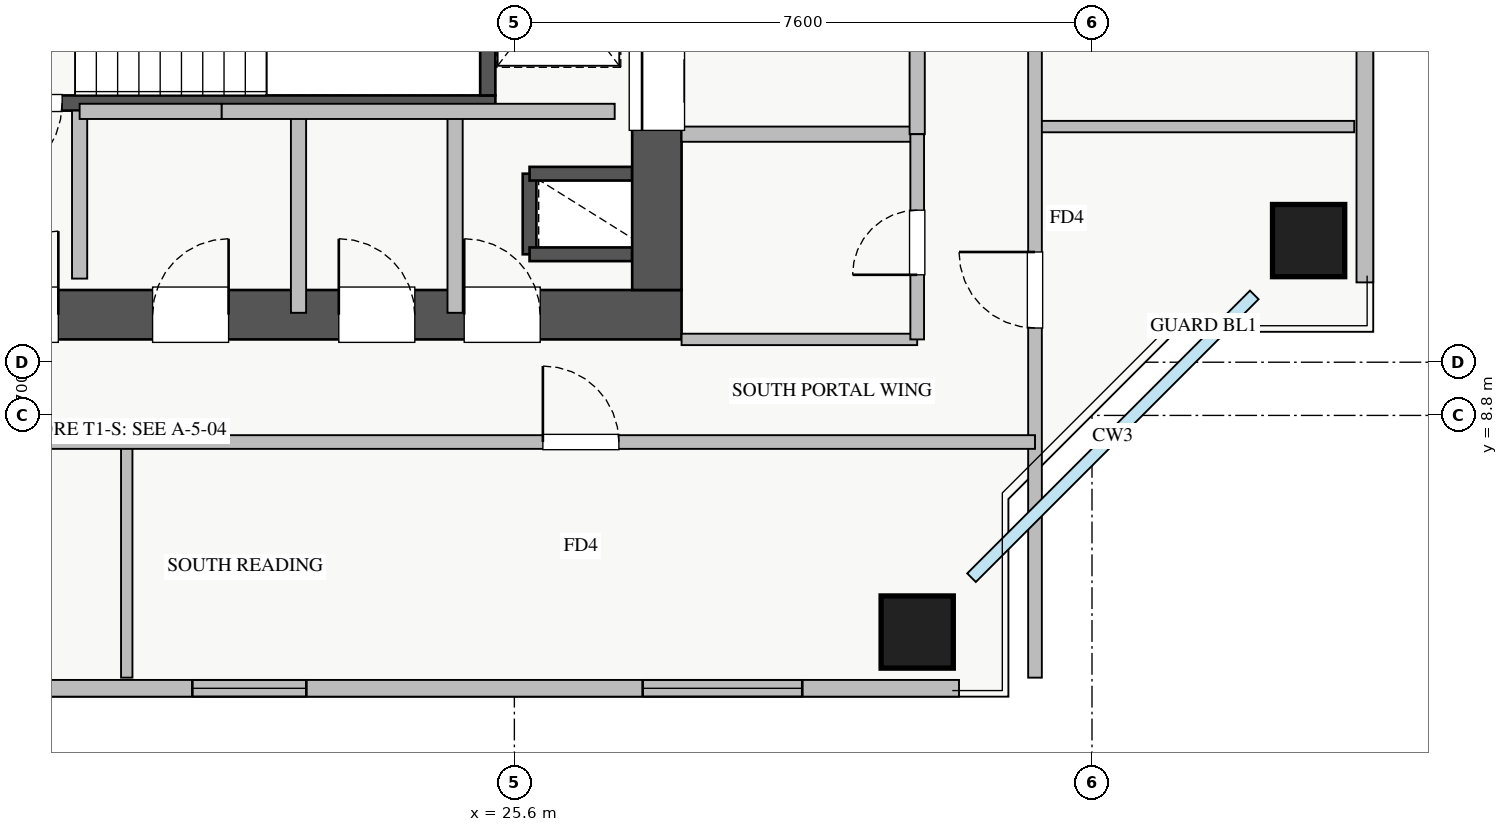
"""IFC4 building model, lengths in metres.
Left out: names, types, materials, properties, quantities, classifications, styles, units other than length and angle.
Written with IfcOpenShell. Run it as: python <this file> out.ifc"""

import sys

from ifc_helpers import new_model, si_unit, direction, frame, frame_2d, origin, origin_2d, place, context, subcontext, project, spatial, rectangle, extrude, source, transform, mapped, element, fill, save


model = new_model("IFC4")
c1 = context("Model", 3, precision=1e-05, world=origin(), true_north=direction((0.0, 1.0)))
c2 = subcontext(c1, "Body", "Model", "MODEL_VIEW")
j1 = project(units=[si_unit("LENGTHUNIT", "METRE"), si_unit("PLANEANGLEUNIT", "RADIAN")], contexts=[c1])
p1 = place(None, origin())
s1 = spatial("IfcSite", under=j1, at=p1, CompositionType="ELEMENT")
p2 = place(p1, origin())
s2 = spatial("IfcBuilding", under=s1, at=p2, CompositionType="ELEMENT")
p3 = place(p2, frame((0.0, 0.0, 169.75)))
s3 = spatial("IfcBuildingStorey", under=s2, at=p3, CompositionType="ELEMENT", Elevation=169.75)
p4 = place(p3, frame((25.8, 10.92, 0.0), z_axis=(0.0, 0.0, 1.0), x_axis=(0.0, 1.0, 0.0)))
e1 = element("IfcWall", 1, at=p4, inside=s3, PredefinedType="SHEAR", context=c2, shape_type="SweptSolid", body=[
    extrude(rectangle(XDim=1.06, YDim=0.18, at=frame_2d((0.53, 0.0))), origin(), (0.0, 0.0, 1.0), 3.0),
])
for number, where, z_axis, x_axis in (
    (2, (25.8, 11.98, 0.0), (0.0, 0.0, 1.0), (1.0, 0.0, 0.0)),
    (3, (25.8, 10.92, 0.0), (0.0, 0.0, 1.0), (1.0, 0.0, 0.0)),
):
    element("IfcWall", number, at=place(p3, frame(where, z_axis=z_axis, x_axis=x_axis)), inside=s3, PredefinedType="SHEAR", context=c2, shape_type="SweptSolid", body=[
        extrude(rectangle(XDim=1.35, YDim=0.18, at=frame_2d((0.675, 0.0))), origin(), (0.0, 0.0, 1.0), 3.0),
    ])
p5 = place(p3, frame((18.2, 12.91, 0.0), z_axis=(0.0, 0.0, 1.0), x_axis=(1.0, 0.0, 0.0)))
e4 = element("IfcWall", 4, at=p5, inside=s3, PredefinedType="SHEAR", context=c2, shape_type="SweptSolid", body=[
    extrude(rectangle(XDim=7.15, YDim=0.2, at=frame_2d((3.575, 0.0))), origin(), (0.0, 0.0, 1.0), 3.25),
])
p6 = place(p5, frame((0.35, 0.0, 0.0)))
e5 = element("IfcOpeningElement", 5, at=p6, cuts=e4, PredefinedType="OPENING", context=c2, shape_type="SweptSolid", body=[
    extrude(rectangle(XDim=1.1, YDim=2.05, at=frame_2d((0.55, 1.025))), frame((0.0, 0.11, 0.0), z_axis=(0.0, -1.0, 0.0), x_axis=(1.0, 0.0, 0.0)), (0.0, 0.0, 1.0), 0.22),
])
p7 = place(p3, frame((25.25, 13.01, 0.0), z_axis=(0.0, 0.0, 1.0), x_axis=(0.0, 1.0, 0.0)))
e6 = element("IfcWall", 6, at=p7, inside=s3, PredefinedType="SHEAR", context=c2, shape_type="SweptSolid", body=[
    extrude(rectangle(XDim=2.94, YDim=0.2, at=frame_2d((1.47, 0.0))), origin(), (0.0, 0.0, 1.0), 3.25),
])
p8 = place(p3, frame((10.2, 10.125, 0.0), z_axis=(0.0, 0.0, 1.0), x_axis=(1.0, 0.0, 0.0)))
e7 = element("IfcWall", 7, at=p8, inside=s3, PredefinedType="SHEAR", context=c2, shape_type="SweptSolid", body=[
    extrude(rectangle(XDim=17.6, YDim=0.65, at=frame_2d((8.8, 0.0))), origin(), (0.0, 0.0, 1.0), 3.25),
])
p9 = place(p8, frame((1.15, 0.0, 0.0)))
e8 = element("IfcOpeningElement", 8, at=p9, cuts=e7, PredefinedType="OPENING", context=c2, shape_type="SweptSolid", body=[
    extrude(rectangle(XDim=1.1, YDim=2.05, at=frame_2d((0.55, 1.025))), frame((0.0, 0.335, 0.0), z_axis=(0.0, -1.0, 0.0), x_axis=(1.0, 0.0, 0.0)), (0.0, 0.0, 1.0), 0.67),
])
p10 = place(p8, frame((8.3, 0.0, 0.0)))
e9 = element("IfcOpeningElement", 9, at=p10, cuts=e7, PredefinedType="OPENING", context=c2, shape_type="SweptSolid", body=[
    extrude(rectangle(XDim=1.1, YDim=2.05, at=frame_2d((0.55, 1.025))), frame((0.0, 0.335, 0.0), z_axis=(0.0, -1.0, 0.0), x_axis=(1.0, 0.0, 0.0)), (0.0, 0.0, 1.0), 0.67),
])
p11 = place(p8, frame((4.9, 0.0, 0.0)))
e10 = element("IfcOpeningElement", 10, at=p11, cuts=e7, PredefinedType="OPENING", context=c2, shape_type="SweptSolid", body=[
    extrude(rectangle(XDim=1.1, YDim=2.05, at=frame_2d((0.55, 1.025))), frame((0.0, 0.335, 0.0), z_axis=(0.0, -1.0, 0.0), x_axis=(1.0, 0.0, 0.0)), (0.0, 0.0, 1.0), 0.67),
])
p12 = place(p8, frame((14.74, 0.0, 0.0)))
e11 = element("IfcOpeningElement", 11, at=p12, cuts=e7, PredefinedType="OPENING", context=c2, shape_type="SweptSolid", body=[
    extrude(rectangle(XDim=1.0, YDim=2.05, at=frame_2d((0.5, 1.025))), frame((0.0, 0.335, 0.0), z_axis=(0.0, -1.0, 0.0), x_axis=(1.0, 0.0, 0.0)), (0.0, 0.0, 1.0), 0.67),
])
p13 = place(p8, frame((10.64, 0.0, 0.0)))
e12 = element("IfcOpeningElement", 12, at=p13, cuts=e7, PredefinedType="OPENING", context=c2, shape_type="SweptSolid", body=[
    extrude(rectangle(XDim=1.0, YDim=2.05, at=frame_2d((0.5, 1.025))), frame((0.0, 0.335, 0.0), z_axis=(0.0, -1.0, 0.0), x_axis=(1.0, 0.0, 0.0)), (0.0, 0.0, 1.0), 0.67),
])
p14 = place(p8, frame((13.09, 0.0, 0.0)))
e13 = element("IfcOpeningElement", 13, at=p14, cuts=e7, PredefinedType="OPENING", context=c2, shape_type="SweptSolid", body=[
    extrude(rectangle(XDim=1.0, YDim=2.05, at=frame_2d((0.5, 1.025))), frame((0.0, 0.335, 0.0), z_axis=(0.0, -1.0, 0.0), x_axis=(1.0, 0.0, 0.0)), (0.0, 0.0, 1.0), 0.67),
])
p15 = place(p3, frame((27.475, 10.45, 0.0), z_axis=(0.0, 0.0, 1.0), x_axis=(0.0, 1.0, 0.0)))
e14 = element("IfcWall", 14, at=p15, inside=s3, PredefinedType="SHEAR", context=c2, shape_type="SweptSolid", body=[
    extrude(rectangle(XDim=5.9, YDim=0.65, at=frame_2d((2.95, 0.0))), origin(), (0.0, 0.0, 1.0), 3.25),
])
p16 = place(p15, frame((2.1, 0.0, 0.0)))
e15 = element("IfcOpeningElement", 15, at=p16, cuts=e14, PredefinedType="OPENING", context=c2, shape_type="SweptSolid", body=[
    extrude(rectangle(XDim=1.3, YDim=2.05, at=frame_2d((0.65, 1.025))), frame((0.0, 0.335, 0.0), z_axis=(0.0, -1.0, 0.0), x_axis=(1.0, 0.0, 0.0)), (0.0, 0.0, 1.0), 0.67),
])
m1 = source(origin(), c2, "Body", "SweptSolid", [
    extrude(rectangle(XDim=0.95, YDim=0.95, at=origin_2d()), origin(), (0.0, 0.0, 1.0), 3.25),
])
for number, where, z_axis, x_axis in (
    (16, (30.9, 5.95, 0.0), (0.0, 0.0, 1.0), (1.0, 0.0, 0.0)),
    (17, (36.05, 11.1, 0.0), (0.0, 0.0, 1.0), (1.0, 0.0, 0.0)),
):
    element("IfcColumn", number, at=place(p3, frame(where, z_axis=z_axis, x_axis=x_axis)), inside=s3, PredefinedType="COLUMN", context=c2, shape_type="MappedRepresentation", body=[
        mapped(m1, transform((0.0, 0.0, 0.0), x_axis=(1.0, 0.0, 0.0), y_axis=(0.0, 1.0, 0.0), z_axis=(0.0, 0.0, 1.0), scale=1.0)),
    ])
p17 = place(p3, frame((36.79, 10.55, 0.0), z_axis=(0.0, 0.0, 1.0), x_axis=(0.0, 1.0, 0.0)))
e18 = element("IfcWall", 18, at=p17, inside=s3, PredefinedType="STANDARD", context=c2, shape_type="SweptSolid", body=[
    extrude(rectangle(XDim=6.3, YDim=0.22, at=frame_2d((3.15, 0.0))), origin(), (0.0, 0.0, 1.0), 2.54),
])
p18 = place(p3, frame((6.55, 5.21, 0.0), z_axis=(0.0, 0.0, 1.0), x_axis=(1.0, 0.0, 0.0)))
e19 = element("IfcWall", 19, at=p18, inside=s3, PredefinedType="STANDARD", context=c2, shape_type="SweptSolid", body=[
    extrude(rectangle(XDim=24.9, YDim=0.22, at=frame_2d((12.45, 0.0))), origin(), (0.0, 0.0, 1.0), 2.54),
])
p19 = place(p18, frame((0.3, 0.0, 0.9)))
e20 = element("IfcOpeningElement", 20, at=p19, cuts=e19, PredefinedType="OPENING", context=c2, shape_type="SweptSolid", body=[
    extrude(rectangle(XDim=1.5, YDim=1.5, at=frame_2d((0.75, 0.75))), frame((0.0, 0.12, 0.0), z_axis=(0.0, -1.0, 0.0), x_axis=(1.0, 0.0, 0.0)), (0.0, 0.0, 1.0), 0.24),
])
p20 = place(p18, frame((8.438, 0.0, 0.9)))
e21 = element("IfcOpeningElement", 21, at=p20, cuts=e19, PredefinedType="OPENING", context=c2, shape_type="SweptSolid", body=[
    extrude(rectangle(XDim=1.8, YDim=1.45, at=frame_2d((0.9, 0.725))), frame((0.0, 0.12, 0.0), z_axis=(0.0, -1.0, 0.0), x_axis=(1.0, 0.0, 0.0)), (0.0, 0.0, 1.0), 0.24),
])
p21 = place(p18, frame((14.813, 0.0, 0.9)))
e22 = element("IfcOpeningElement", 22, at=p21, cuts=e19, PredefinedType="OPENING", context=c2, shape_type="SweptSolid", body=[
    extrude(rectangle(XDim=1.5, YDim=1.45, at=frame_2d((0.75, 0.725))), frame((0.0, 0.12, 0.0), z_axis=(0.0, -1.0, 0.0), x_axis=(1.0, 0.0, 0.0)), (0.0, 0.0, 1.0), 0.24),
])
p22 = place(p18, frame((20.738, 0.0, 0.9)))
e23 = element("IfcOpeningElement", 23, at=p22, cuts=e19, PredefinedType="OPENING", context=c2, shape_type="SweptSolid", body=[
    extrude(rectangle(XDim=2.1, YDim=1.46, at=frame_2d((1.05, 0.73))), frame((0.0, 0.12, 0.0), z_axis=(0.0, -1.0, 0.0), x_axis=(1.0, 0.0, 0.0)), (0.0, 0.0, 1.0), 0.24),
])
p23 = place(p18, frame((4.094, 0.0, 0.9)))
e24 = element("IfcOpeningElement", 24, at=p23, cuts=e19, PredefinedType="OPENING", context=c2, shape_type="SweptSolid", body=[
    extrude(rectangle(XDim=2.4, YDim=1.5, at=frame_2d((1.2, 0.75))), frame((0.0, 0.12, 0.0), z_axis=(0.0, -1.0, 0.0), x_axis=(1.0, 0.0, 0.0)), (0.0, 0.0, 1.0), 0.24),
])
p24 = place(p3, frame((27.8, 12.5, 0.0), z_axis=(0.0, 0.0, 1.0), x_axis=(1.0, 0.0, 0.0)))
e25 = element("IfcWall", 25, at=p24, inside=s3, PredefinedType="PARTITIONING", context=c2, shape_type="SweptSolid", body=[
    extrude(rectangle(XDim=3.1, YDim=0.2, at=frame_2d((1.55, 0.0))), origin(), (0.0, 0.0, 1.0), 3.0),
])
p25 = place(p3, frame((30.9, 12.5, 0.0), z_axis=(0.0, 0.0, 1.0), x_axis=(0.0, 1.0, 0.0)))
e26 = element("IfcWall", 26, at=p25, inside=s3, PredefinedType="PARTITIONING", context=c2, shape_type="SweptSolid", body=[
    extrude(rectangle(XDim=3.9, YDim=0.2, at=frame_2d((1.95, 0.0))), origin(), (0.0, 0.0, 1.0), 3.0),
])
p26 = place(p25, frame((1.4, 0.0, 0.0)))
e27 = element("IfcOpeningElement", 27, at=p26, cuts=e26, PredefinedType="OPENING", context=c2, shape_type="SweptSolid", body=[
    extrude(rectangle(XDim=1.1, YDim=2.05, at=frame_2d((0.55, 1.025))), frame((0.0, 0.11, 0.0), z_axis=(0.0, -1.0, 0.0), x_axis=(1.0, 0.0, 0.0)), (0.0, 0.0, 1.0), 0.22),
])
p27 = place(p3, frame((19.88, 10.6, 0.0), z_axis=(0.0, 0.0, 1.0), x_axis=(0.0, 1.0, 0.0)))
e28 = element("IfcWall", 28, at=p27, inside=s3, PredefinedType="PARTITIONING", context=c2, shape_type="SweptSolid", body=[
    extrude(rectangle(XDim=2.21, YDim=0.2, at=frame_2d((1.105, 0.0))), origin(), (0.0, 0.0, 1.0), 3.0),
])
p28 = place(p3, frame((24.82, 10.15, 0.0), z_axis=(0.0, 0.0, 1.0), x_axis=(0.0, 1.0, 0.0)))
e29 = element("IfcWall", 29, at=p28, inside=s3, PredefinedType="PARTITIONING", context=c2, shape_type="SweptSolid", body=[
    extrude(rectangle(XDim=2.65, YDim=0.2, at=frame_2d((1.325, 0.0))), origin(), (0.0, 0.0, 1.0), 3.0),
])
p29 = place(p3, frame((19.88, 12.8, 0.0), z_axis=(0.0, 0.0, 1.0), x_axis=(1.0, 0.0, 0.0)))
e30 = element("IfcWall", 30, at=p29, inside=s3, PredefinedType="PARTITIONING", context=c2, shape_type="SweptSolid", body=[
    extrude(rectangle(XDim=1.87, YDim=0.2, at=frame_2d((0.935, 0.0))), origin(), (0.0, 0.0, 1.0), 3.0),
])
p30 = place(p3, frame((22.76, 10.15, 0.0), z_axis=(0.0, 0.0, 1.0), x_axis=(0.0, 1.0, 0.0)))
e31 = element("IfcWall", 31, at=p30, inside=s3, PredefinedType="PARTITIONING", context=c2, shape_type="SweptSolid", body=[
    extrude(rectangle(XDim=2.65, YDim=0.2, at=frame_2d((1.325, 0.0))), origin(), (0.0, 0.0, 1.0), 3.0),
])
p31 = place(p3, frame((21.75, 12.8, 0.0), z_axis=(0.0, 0.0, 1.0), x_axis=(1.0, 0.0, 0.0)))
e32 = element("IfcWall", 32, at=p31, inside=s3, PredefinedType="PARTITIONING", context=c2, shape_type="SweptSolid", body=[
    extrude(rectangle(XDim=5.17, YDim=0.2, at=frame_2d((2.585, 0.0))), origin(), (0.0, 0.0, 1.0), 3.0),
])
p32 = place(p3, frame((27.8, 9.8, 0.0), z_axis=(0.0, 0.0, 1.0), x_axis=(1.0, 0.0, 0.0)))
e33 = element("IfcWall", 33, at=p32, inside=s3, PredefinedType="PARTITIONING", context=c2, shape_type="SweptSolid", body=[
    extrude(rectangle(XDim=3.1, YDim=0.15, at=frame_2d((1.55, 0.0))), origin(), (0.0, 0.0, 1.0), 3.0),
])
p33 = place(p3, frame((30.9, 9.8, 0.0), z_axis=(0.0, 0.0, 1.0), x_axis=(0.0, 1.0, 0.0)))
e34 = element("IfcWall", 34, at=p33, inside=s3, PredefinedType="PARTITIONING", context=c2, shape_type="SweptSolid", body=[
    extrude(rectangle(XDim=2.7, YDim=0.18, at=frame_2d((1.35, 0.0))), origin(), (0.0, 0.0, 1.0), 2.495),
])
p34 = place(p33, frame((0.85, 0.0, 0.0)))
e35 = element("IfcOpeningElement", 35, at=p34, cuts=e34, PredefinedType="OPENING", context=c2, shape_type="SweptSolid", body=[
    extrude(rectangle(XDim=0.85, YDim=2.05, at=frame_2d((0.425, 1.025))), frame((0.0, 0.1, 0.0), z_axis=(0.0, -1.0, 0.0), x_axis=(1.0, 0.0, 0.0)), (0.0, 0.0, 1.0), 0.2),
])
p35 = place(p3, frame((32.45, 12.6, 0.0), z_axis=(0.0, 0.0, 1.0), x_axis=(1.0, 0.0, 0.0)))
e36 = element("IfcWall", 36, at=p35, inside=s3, PredefinedType="PARTITIONING", context=c2, shape_type="SweptSolid", body=[
    extrude(rectangle(XDim=4.2, YDim=0.15, at=frame_2d((2.1, 0.0))), origin(), (0.0, 0.0, 1.0), 3.0),
])
p36 = place(p3, frame((32.45, 5.35, 0.0), z_axis=(0.0, 0.0, 1.0), x_axis=(0.0, 1.0, 0.0)))
e37 = element("IfcWall", 37, at=p36, inside=s3, PredefinedType="PARTITIONING", context=c2, shape_type="SweptSolid", body=[
    extrude(rectangle(XDim=11.35, YDim=0.18, at=frame_2d((5.675, 0.0))), origin(), (0.0, 0.0, 1.0), 3.0),
])
p37 = place(p36, frame((4.6, 0.0, 0.0)))
e38 = element("IfcOpeningElement", 38, at=p37, cuts=e37, PredefinedType="OPENING", context=c2, shape_type="SweptSolid", body=[
    extrude(rectangle(XDim=1.0, YDim=2.05, at=frame_2d((0.5, 1.025))), frame((0.0, 0.1, 0.0), z_axis=(0.0, -1.0, 0.0), x_axis=(1.0, 0.0, 0.0)), (0.0, 0.0, 1.0), 0.2),
])
p38 = place(p36, frame((8.8, 0.0, 0.0)))
e39 = element("IfcOpeningElement", 39, at=p38, cuts=e37, PredefinedType="OPENING", context=c2, shape_type="SweptSolid", body=[
    extrude(rectangle(XDim=1.0, YDim=2.05, at=frame_2d((0.5, 1.025))), frame((0.0, 0.1, 0.0), z_axis=(0.0, -1.0, 0.0), x_axis=(1.0, 0.0, 0.0)), (0.0, 0.0, 1.0), 0.2),
])
p39 = place(p3, frame((20.5, 5.35, 0.0), z_axis=(0.0, 0.0, 1.0), x_axis=(0.0, 1.0, 0.0)))
e40 = element("IfcWall", 40, at=p39, inside=s3, PredefinedType="PARTITIONING", context=c2, shape_type="SweptSolid", body=[
    extrude(rectangle(XDim=3.1, YDim=0.15, at=frame_2d((1.55, 0.0))), origin(), (0.0, 0.0, 1.0), 3.0),
])
p40 = place(p3, frame((8.65, 8.45, 0.0), z_axis=(0.0, 0.0, 1.0), x_axis=(1.0, 0.0, 0.0)))
e41 = element("IfcWall", 41, at=p40, inside=s3, PredefinedType="PARTITIONING", context=c2, shape_type="SweptSolid", body=[
    extrude(rectangle(XDim=23.8, YDim=0.18, at=frame_2d((11.9, 0.0))), origin(), (0.0, 0.0, 1.0), 3.0),
])
p41 = place(p40, frame((5.425, 0.0, 0.0)))
e42 = element("IfcOpeningElement", 42, at=p41, cuts=e41, PredefinedType="OPENING", context=c2, shape_type="SweptSolid", body=[
    extrude(rectangle(XDim=1.0, YDim=2.05, at=frame_2d((0.5, 1.025))), frame((0.0, 0.1, 0.0), z_axis=(0.0, -1.0, 0.0), x_axis=(1.0, 0.0, 0.0)), (0.0, 0.0, 1.0), 0.2),
])
p42 = place(p40, frame((17.325, 0.0, 0.0)))
e43 = element("IfcOpeningElement", 43, at=p42, cuts=e41, PredefinedType="OPENING", context=c2, shape_type="SweptSolid", body=[
    extrude(rectangle(XDim=1.0, YDim=2.05, at=frame_2d((0.5, 1.025))), frame((0.0, 0.1, 0.0), z_axis=(0.0, -1.0, 0.0), x_axis=(1.0, 0.0, 0.0)), (0.0, 0.0, 1.0), 0.2),
])
m2 = source(origin(), c2, "Body", "SweptSolid", [
    extrude(rectangle(XDim=1.5, YDim=1.45, at=frame_2d((0.75, 0.725))), frame((0.0, 0.03, 0.0), z_axis=(0.0, -1.0, 0.0), x_axis=(1.0, 0.0, 0.0)), (0.0, 0.0, 1.0), 0.06),
])
p43 = place(p21, origin())
e44 = element("IfcWindow", 44, at=p43, inside=s3, PartitioningType="DOUBLE_PANEL_VERTICAL", PredefinedType="WINDOW", context=c2, shape_type="MappedRepresentation", body=[
    mapped(m2, transform((0.0, 0.0, 0.0), x_axis=(1.0, 0.0, 0.0), y_axis=(0.0, 1.0, 0.0), z_axis=(0.0, 0.0, 1.0), scale=1.0)),
])
fill(e22, e44)
m3 = source(origin(), c2, "Body", "SweptSolid", [
    extrude(rectangle(XDim=2.1, YDim=1.46, at=frame_2d((1.05, 0.73))), frame((0.0, 0.03, 0.0), z_axis=(0.0, -1.0, 0.0), x_axis=(1.0, 0.0, 0.0)), (0.0, 0.0, 1.0), 0.06),
])
p44 = place(p22, origin())
e45 = element("IfcWindow", 45, at=p44, inside=s3, PartitioningType="TRIPLE_PANEL_VERTICAL", PredefinedType="WINDOW", context=c2, shape_type="MappedRepresentation", body=[
    mapped(m3, transform((0.0, 0.0, 0.0), x_axis=(1.0, 0.0, 0.0), y_axis=(0.0, 1.0, 0.0), z_axis=(0.0, 0.0, 1.0), scale=1.0)),
])
fill(e23, e45)
m4 = source(origin(), c2, "Body", "SweptSolid", [
    extrude(rectangle(XDim=1.3, YDim=2.05, at=frame_2d((0.65, 1.025))), frame((0.0, 0.025, 0.0), z_axis=(0.0, -1.0, 0.0), x_axis=(1.0, 0.0, 0.0)), (0.0, 0.0, 1.0), 0.05),
])
p45 = place(p16, origin())
e46 = element("IfcDoor", 46, at=p45, inside=s3, OperationType="SLIDING_TO_RIGHT", PredefinedType="DOOR", context=c2, shape_type="MappedRepresentation", body=[
    mapped(m4, transform((0.0, 0.0, 0.0), x_axis=(1.0, 0.0, 0.0), y_axis=(0.0, 1.0, 0.0), z_axis=(0.0, 0.0, 1.0), scale=1.0)),
])
fill(e15, e46)
m5 = source(origin(), c2, "Body", "SweptSolid", [
    extrude(rectangle(XDim=1.1, YDim=2.05, at=frame_2d((0.55, 1.025))), frame((0.0, 0.025, 0.0), z_axis=(0.0, -1.0, 0.0), x_axis=(1.0, 0.0, 0.0)), (0.0, 0.0, 1.0), 0.05),
])
p46 = place(p10, origin())
e47 = element("IfcDoor", 47, at=p46, inside=s3, OperationType="SINGLE_SWING_RIGHT", PredefinedType="DOOR", context=c2, shape_type="MappedRepresentation", body=[
    mapped(m5, transform((0.0, 0.0, 0.0), x_axis=(1.0, 0.0, 0.0), y_axis=(0.0, 1.0, 0.0), z_axis=(0.0, 0.0, 1.0), scale=1.0)),
])
fill(e9, e47)
p47 = place(p6, frame((1.1, 0.0, 0.0), z_axis=(0.0, 0.0, 1.0), x_axis=(-1.0, 0.0, 0.0)))
e48 = element("IfcDoor", 48, at=p47, inside=s3, OperationType="SINGLE_SWING_LEFT", PredefinedType="DOOR", context=c2, shape_type="MappedRepresentation", body=[
    mapped(m5, transform((0.0, 0.0, 0.0), x_axis=(1.0, 0.0, 0.0), y_axis=(0.0, 1.0, 0.0), z_axis=(0.0, 0.0, 1.0), scale=1.0)),
])
fill(e5, e48)
m6 = source(origin(), c2, "Body", "SweptSolid", [
    extrude(rectangle(XDim=1.0, YDim=2.05, at=frame_2d((0.5, 1.025))), frame((0.0, 0.025, 0.0), z_axis=(0.0, -1.0, 0.0), x_axis=(1.0, 0.0, 0.0)), (0.0, 0.0, 1.0), 0.05),
])
p48 = place(p12, origin())
e49 = element("IfcDoor", 49, at=p48, inside=s3, OperationType="SINGLE_SWING_LEFT", PredefinedType="DOOR", context=c2, shape_type="MappedRepresentation", body=[
    mapped(m6, transform((0.0, 0.0, 0.0), x_axis=(1.0, 0.0, 0.0), y_axis=(0.0, 1.0, 0.0), z_axis=(0.0, 0.0, 1.0), scale=1.0)),
])
fill(e11, e49)
p49 = place(p13, origin())
e50 = element("IfcDoor", 50, at=p49, inside=s3, OperationType="SINGLE_SWING_RIGHT", PredefinedType="DOOR", context=c2, shape_type="MappedRepresentation", body=[
    mapped(m6, transform((0.0, 0.0, 0.0), x_axis=(1.0, 0.0, 0.0), y_axis=(0.0, 1.0, 0.0), z_axis=(0.0, 0.0, 1.0), scale=1.0)),
])
fill(e12, e50)
p50 = place(p14, origin())
e51 = element("IfcDoor", 51, at=p50, inside=s3, OperationType="SINGLE_SWING_LEFT", PredefinedType="DOOR", context=c2, shape_type="MappedRepresentation", body=[
    mapped(m6, transform((0.0, 0.0, 0.0), x_axis=(1.0, 0.0, 0.0), y_axis=(0.0, 1.0, 0.0), z_axis=(0.0, 0.0, 1.0), scale=1.0)),
])
fill(e13, e51)
m7 = source(origin(), c2, "Body", "SweptSolid", [
    extrude(rectangle(XDim=0.85, YDim=2.05, at=frame_2d((0.425, 1.025))), frame((0.0, 0.025, 0.0), z_axis=(0.0, -1.0, 0.0), x_axis=(1.0, 0.0, 0.0)), (0.0, 0.0, 1.0), 0.05),
])
p51 = place(p34, origin())
e52 = element("IfcDoor", 52, at=p51, inside=s3, OperationType="SINGLE_SWING_LEFT", PredefinedType="DOOR", context=c2, shape_type="MappedRepresentation", body=[
    mapped(m7, transform((0.0, 0.0, 0.0), x_axis=(1.0, 0.0, 0.0), y_axis=(0.0, 1.0, 0.0), z_axis=(0.0, 0.0, 1.0), scale=1.0)),
])
fill(e35, e52)
p52 = place(p37, origin())
e53 = element("IfcDoor", 53, at=p52, inside=s3, OperationType="SINGLE_SWING_RIGHT", PredefinedType="DOOR", context=c2, shape_type="MappedRepresentation", body=[
    mapped(m6, transform((0.0, 0.0, 0.0), x_axis=(1.0, 0.0, 0.0), y_axis=(0.0, 1.0, 0.0), z_axis=(0.0, 0.0, 1.0), scale=1.0)),
])
fill(e38, e53)
p53 = place(p42, origin())
e54 = element("IfcDoor", 54, at=p53, inside=s3, OperationType="SINGLE_SWING_LEFT", PredefinedType="DOOR", context=c2, shape_type="MappedRepresentation", body=[
    mapped(m6, transform((0.0, 0.0, 0.0), x_axis=(1.0, 0.0, 0.0), y_axis=(0.0, 1.0, 0.0), z_axis=(0.0, 0.0, 1.0), scale=1.0)),
])
fill(e43, e54)
save(model, sys.argv[1])
